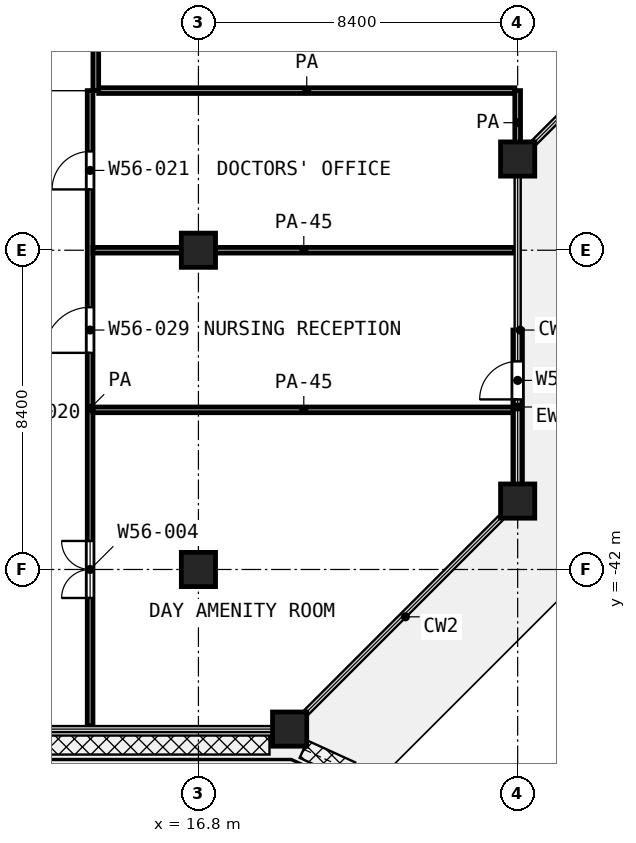
"""IFC4 building model, lengths in metres.
Left out: names, types, materials, properties, quantities, classifications, styles, units other than length and angle.
Written with IfcOpenShell. Run it as: python <this file> out.ifc"""

import sys

from ifc_helpers import new_model, si_unit, direction, frame, frame_2d, origin, origin_2d, place, context, subcontext, project, spatial, rectangle, extrude, element, fill, save


model = new_model("IFC4")
c1 = context("Model", 3, precision=1e-05, world=origin(), true_north=direction((0.0, 1.0)))
c2 = subcontext(c1, "Body", "Model", "MODEL_VIEW")
j1 = project(units=[si_unit("LENGTHUNIT", "METRE"), si_unit("PLANEANGLEUNIT", "RADIAN")], contexts=[c1])
p1 = place(None, origin())
s1 = spatial("IfcSite", under=j1, at=p1, CompositionType="ELEMENT")
p2 = place(p1, origin())
s2 = spatial("IfcBuilding", under=s1, at=p2, CompositionType="ELEMENT")
p3 = place(p2, frame((0.0, 0.0, 243.2)))
s3 = spatial("IfcBuildingStorey", under=s2, at=p3, CompositionType="ELEMENT", Elevation=243.2)
for number, where, z_axis, x_axis in (
    (1, (25.2, -31.2, 0.0), (0.0, 0.0, 1.0), (1.0, 0.0, 0.0)),
    (2, (16.8, -33.6, 0.0), (0.0, 0.0, 1.0), (1.0, 0.0, 0.0)),
    (3, (25.2, -40.2, 0.0), (0.0, 0.0, 1.0), (1.0, 0.0, 0.0)),
    (4, (16.8, -42.0, 0.0), (0.0, 0.0, 1.0), (1.0, 0.0, 0.0)),
    (5, (19.2, -46.2, 0.0), (0.0, 0.0, 1.0), (1.0, 0.0, 0.0)),
):
    element("IfcColumn", number, at=place(p3, frame(where, z_axis=z_axis, x_axis=x_axis)), inside=s3, PredefinedType="COLUMN", context=c2, shape_type="SweptSolid", body=[
        extrude(rectangle(XDim=0.9, YDim=0.9, at=origin_2d()), origin(), (0.0, 0.0, 1.0), 4.2),
    ])
p4 = place(p3, frame((25.2, -39.75, 0.0), z_axis=(0.0, 0.0, 1.0), x_axis=(0.0, 1.0, 0.0)))
e6 = element("IfcWall", 6, at=p4, inside=s3, PredefinedType="SOLIDWALL", context=c2, shape_type="SweptSolid", body=[
    extrude(rectangle(XDim=4.05, YDim=0.25, at=frame_2d((2.025, 0.0))), origin(), (0.0, 0.0, 1.0), 2.58),
])
p5 = place(p4, frame((2.225, 0.0, 0.0)))
e7 = element("IfcOpeningElement", 7, at=p5, cuts=e6, PredefinedType="OPENING", context=c2, shape_type="SweptSolid", body=[
    extrude(rectangle(XDim=1.0, YDim=2.1, at=frame_2d((0.5, 1.05))), frame((0.0, 0.135, 0.0), z_axis=(0.0, -1.0, 0.0), x_axis=(1.0, 0.0, 0.0)), (0.0, 0.0, 1.0), 0.27),
])
for number, where, z_axis, x_axis in (
    (8, (14.025, -37.8, 0.0), (0.0, 0.0, 1.0), (1.0, 0.0, 0.0)),
    (9, (14.025, -33.6, 0.0), (0.0, 0.0, 1.0), (1.0, 0.0, 0.0)),
):
    element("IfcWall", number, at=place(p3, frame(where, z_axis=z_axis, x_axis=x_axis)), inside=s3, PredefinedType="PARTITIONING", context=c2, shape_type="SweptSolid", body=[
        extrude(rectangle(XDim=11.095, YDim=0.15, at=frame_2d((5.548, 0.0))), origin(), (0.0, 0.0, 1.0), 2.7),
    ])
p6 = place(p3, frame((14.175, -29.4, 0.0), z_axis=(0.0, 0.0, 1.0), x_axis=(1.0, 0.0, 0.0)))
e10 = element("IfcWall", 10, at=p6, inside=s3, PredefinedType="PARTITIONING", context=c2, shape_type="SweptSolid", body=[
    extrude(rectangle(XDim=10.95, YDim=0.15, at=frame_2d((5.475, 0.0))), origin(), (0.0, 0.0, 1.0), 3.6),
])
p7 = place(p3, frame((13.95, -46.12, 0.0), z_axis=(0.0, 0.0, 1.0), x_axis=(0.0, 1.0, 0.0)))
e11 = element("IfcWall", 11, at=p7, inside=s3, PredefinedType="PARTITIONING", context=c2, shape_type="SweptSolid", body=[
    extrude(rectangle(XDim=16.72, YDim=0.15, at=frame_2d((8.36, 0.0))), origin(), (0.0, 0.0, 1.0), 3.6),
])
p8 = place(p7, frame((14.12, 0.0, 0.0)))
e12 = element("IfcOpeningElement", 12, at=p8, cuts=e11, PredefinedType="OPENING", context=c2, shape_type="SweptSolid", body=[
    extrude(rectangle(XDim=1.0, YDim=2.1, at=frame_2d((0.5, 1.05))), frame((0.0, 0.085, 0.0), z_axis=(0.0, -1.0, 0.0), x_axis=(1.0, 0.0, 0.0)), (0.0, 0.0, 1.0), 0.17),
])
p9 = place(p7, frame((9.82, 0.0, 0.0)))
e13 = element("IfcOpeningElement", 13, at=p9, cuts=e11, PredefinedType="OPENING", context=c2, shape_type="SweptSolid", body=[
    extrude(rectangle(XDim=1.2, YDim=2.1, at=frame_2d((0.6, 1.05))), frame((0.0, 0.085, 0.0), z_axis=(0.0, -1.0, 0.0), x_axis=(1.0, 0.0, 0.0)), (0.0, 0.0, 1.0), 0.17),
])
p10 = place(p7, frame((3.37, 0.0, 0.0)))
e14 = element("IfcOpeningElement", 14, at=p10, cuts=e11, PredefinedType="OPENING", context=c2, shape_type="SweptSolid", body=[
    extrude(rectangle(XDim=1.5, YDim=2.1, at=frame_2d((0.75, 1.05))), frame((0.0, 0.085, 0.0), z_axis=(0.0, -1.0, 0.0), x_axis=(1.0, 0.0, 0.0)), (0.0, 0.0, 1.0), 0.17),
])
p11 = place(p3, frame((14.1, -29.4, 0.0), z_axis=(0.0, 0.0, 1.0), x_axis=(0.0, 1.0, 0.0)))
e15 = element("IfcWall", 15, at=p11, inside=s3, PredefinedType="PARTITIONING", context=c2, shape_type="SweptSolid", body=[
    extrude(rectangle(XDim=4.6, YDim=0.15, at=frame_2d((2.3, 0.0))), origin(), (0.0, 0.0, 1.0), 3.6),
])
p12 = place(p3, frame((25.2, -31.087, 0.0), z_axis=(0.0, 0.0, 1.0), x_axis=(0.0, 1.0, 0.0)))
e16 = element("IfcWall", 16, at=p12, inside=s3, PredefinedType="PARTITIONING", context=c2, shape_type="SweptSolid", body=[
    extrude(rectangle(XDim=1.687, YDim=0.15, at=frame_2d((0.844, 0.0))), origin(), (0.0, 0.0, 1.0), 3.6),
])
p13 = place(p5, origin())
e17 = element("IfcDoor", 17, at=p13, inside=s3, OperationType="SINGLE_SWING_LEFT", PredefinedType="DOOR", context=c2, shape_type="SweptSolid", body=[
    extrude(rectangle(XDim=1.0, YDim=2.1, at=frame_2d((0.5, 1.05))), frame((0.0, 0.025, 0.0), z_axis=(0.0, -1.0, 0.0), x_axis=(1.0, 0.0, 0.0)), (0.0, 0.0, 1.0), 0.05),
])
fill(e7, e17)
p14 = place(p8, origin())
e18 = element("IfcDoor", 18, at=p14, inside=s3, OperationType="SINGLE_SWING_LEFT", PredefinedType="DOOR", context=c2, shape_type="SweptSolid", body=[
    extrude(rectangle(XDim=1.0, YDim=2.1, at=frame_2d((0.5, 1.05))), frame((0.0, 0.025, 0.0), z_axis=(0.0, -1.0, 0.0), x_axis=(1.0, 0.0, 0.0)), (0.0, 0.0, 1.0), 0.05),
])
fill(e12, e18)
p15 = place(p9, origin())
e19 = element("IfcDoor", 19, at=p15, inside=s3, OperationType="SINGLE_SWING_LEFT", PredefinedType="DOOR", context=c2, shape_type="SweptSolid", body=[
    extrude(rectangle(XDim=1.2, YDim=2.1, at=frame_2d((0.6, 1.05))), frame((0.0, 0.025, 0.0), z_axis=(0.0, -1.0, 0.0), x_axis=(1.0, 0.0, 0.0)), (0.0, 0.0, 1.0), 0.05),
])
fill(e13, e19)
p16 = place(p10, origin())
e20 = element("IfcDoor", 20, at=p16, inside=s3, OperationType="DOUBLE_DOOR_SINGLE_SWING", PredefinedType="DOOR", context=c2, shape_type="SweptSolid", body=[
    extrude(rectangle(XDim=1.5, YDim=2.1, at=frame_2d((0.75, 1.05))), frame((0.0, 0.025, 0.0), z_axis=(0.0, -1.0, 0.0), x_axis=(1.0, 0.0, 0.0)), (0.0, 0.0, 1.0), 0.05),
])
fill(e14, e20)
save(model, sys.argv[1])
